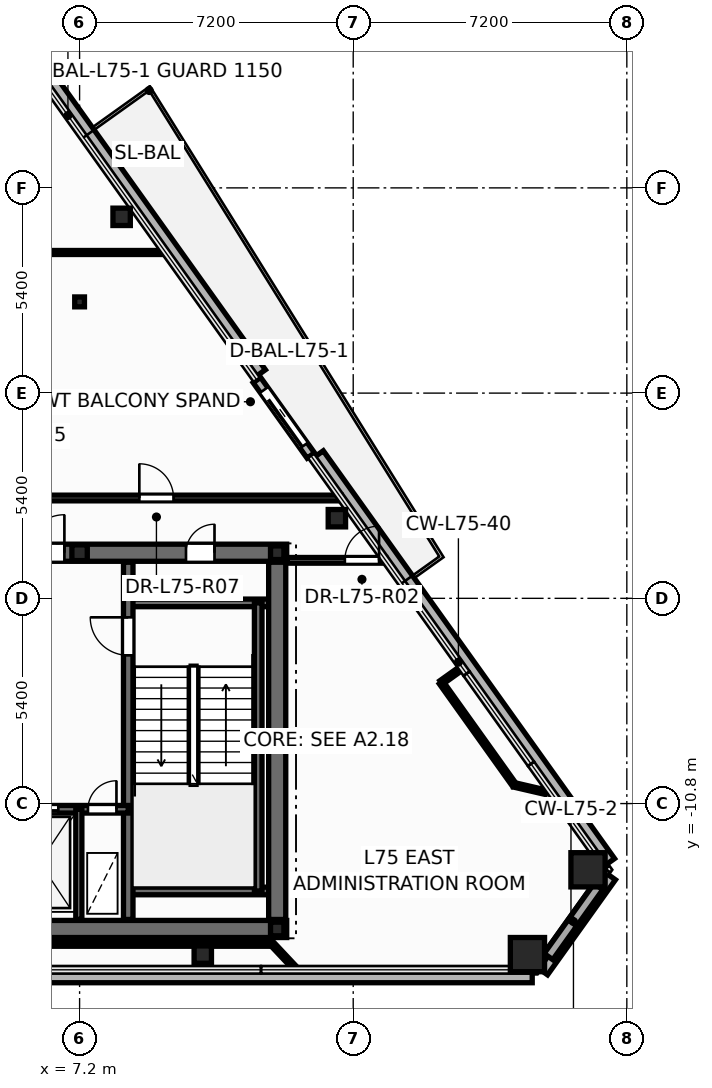
"""IFC4 building model, lengths in metres.
Left out: names, types, materials, properties, quantities, classifications, styles, units other than length and angle.
Written with IfcOpenShell. Run it as: python <this file> out.ifc"""

import sys

from ifc_helpers import new_model, si_unit, direction, frame, frame_2d, origin, origin_2d, place, context, subcontext, project, spatial, rectangle, hollow_rectangle, hollow_circle, i_section, extrude, element, fill, save


model = new_model("IFC4")
c1 = context("Model", 3, precision=1e-05, world=origin(), true_north=direction((0.0, 1.0)))
c2 = subcontext(c1, "Body", "Model", "MODEL_VIEW")
j1 = project(units=[si_unit("LENGTHUNIT", "METRE"), si_unit("PLANEANGLEUNIT", "RADIAN")], contexts=[c1])
p1 = place(None, origin())
s1 = spatial("IfcSite", under=j1, at=p1, CompositionType="ELEMENT")
p2 = place(p1, origin())
s2 = spatial("IfcBuilding", under=s1, at=p2, CompositionType="ELEMENT")
p3 = place(p2, frame((0.0, 0.0, 285.0)))
s3 = spatial("IfcBuildingStorey", under=s2, at=p3, CompositionType="ELEMENT", Elevation=285.0)
for number, where, z_axis, x_axis in (
    (1, (18.985, -14.774, 0.0), (0.0, 0.0, 1.0), (1.0, 0.0, 0.0)),
    (2, (20.579, -12.543, 0.0), (0.0, 0.0, 1.0), (1.0, 0.0, 0.0)),
):
    element("IfcColumn", number, at=place(p3, frame(where, z_axis=z_axis, x_axis=x_axis)), inside=s3, PredefinedType="COLUMN", context=c2, shape_type="SweptSolid", body=[
        extrude(hollow_rectangle(XDim=0.9, YDim=0.9, WallThickness=0.04, at=origin_2d()), origin(), (0.0, 0.0, 1.0), 4.2),
    ])
for number, where, z_axis, x_axis in (
    (3, (10.442, -14.774, 0.0), (0.0, 0.0, 1.0), (1.0, 0.0, 0.0)),
    (4, (13.97, -3.292, 0.0), (0.0, 0.0, 1.0), (1.0, 0.0, 0.0)),
    (5, (8.306, 4.638, 0.0), (0.0, 0.0, 1.0), (1.0, 0.0, 0.0)),
):
    element("IfcColumn", number, at=place(p3, frame(where, z_axis=z_axis, x_axis=x_axis)), inside=s3, PredefinedType="COLUMN", context=c2, shape_type="SweptSolid", body=[
        extrude(hollow_circle(Radius=0.229, WallThickness=0.016, at=origin_2d()), origin(), (0.0, 0.0, 1.0), 4.2),
    ])
for number, where, z_axis, x_axis in (
    (6, (12.4, -14.1, 0.0), (0.0, 0.0, 1.0), (1.0, 0.0, 0.0)),
    (7, (12.4, -4.2, 0.0), (0.0, 0.0, 1.0), (1.0, 0.0, 0.0)),
):
    element("IfcColumn", number, at=place(p3, frame(where, z_axis=z_axis, x_axis=x_axis)), inside=s3, PredefinedType="COLUMN", context=c2, shape_type="SweptSolid", body=[
        extrude(i_section(OverallWidth=0.352, OverallDepth=0.359, WebThickness=0.018, FlangeThickness=0.026, at=origin_2d()), origin(), (0.0, 0.0, 1.0), 4.2),
    ])
p4 = place(p3, frame((7.2, -4.2, 0.0), z_axis=(0.0, 0.0, 1.0), x_axis=(1.0, 0.0, 0.0)))
e8 = element("IfcColumn", 8, at=p4, inside=s3, PredefinedType="PILASTER", context=c2, shape_type="SweptSolid", body=[
    extrude(i_section(OverallWidth=0.405, OverallDepth=0.414, WebThickness=0.022, FlangeThickness=0.032, at=origin_2d()), origin(), (0.0, 0.0, 1.0), 4.2),
])
p5 = place(p3, frame((7.2, 2.4, 0.0), z_axis=(0.0, 0.0, 1.0), x_axis=(1.0, 0.0, 0.0)))
e9 = element("IfcColumn", 9, at=p5, inside=s3, PredefinedType="COLUMN", context=c2, shape_type="SweptSolid", body=[
    extrude(i_section(OverallWidth=0.256, OverallDepth=0.26, WebThickness=0.01, FlangeThickness=0.017, at=origin_2d()), origin(), (0.0, 0.0, 1.0), 4.2),
])
p6 = place(p3, frame((-19.111, -15.334, -0.2), z_axis=(0.0, 0.0, 1.0), x_axis=(1.0, 0.0, 0.0)))
e10 = element("IfcWall", 10, at=p6, inside=s3, PredefinedType="PARAPET", context=c2, shape_type="SweptSolid", body=[
    extrude(rectangle(XDim=38.221, YDim=0.36, at=frame_2d((19.111, 0.0))), origin(), (0.0, 0.0, 1.0), 0.38),
])
p7 = place(p3, frame((19.367, -15.202, -0.2), z_axis=(0.0, 0.0, 1.0), x_axis=(0.581260731052, 0.813717372641, 0.0)))
e11 = element("IfcWall", 11, at=p7, inside=s3, PredefinedType="PARAPET", context=c2, shape_type="SweptSolid", body=[
    extrude(rectangle(XDim=3.074, YDim=0.36, at=frame_2d((1.537, 0.0))), origin(), (0.0, 0.0, 1.0), 0.38),
])
p8 = place(p3, frame((21.131, -12.352, -0.2), z_axis=(0.0, 0.0, 1.0), x_axis=(-0.581231188145, 0.813738475143, 0.0)))
e12 = element("IfcWall", 12, at=p8, inside=s3, PredefinedType="PARAPET", context=c2, shape_type="SweptSolid", body=[
    extrude(rectangle(XDim=13.186, YDim=0.36, at=frame_2d((6.593, 0.0))), origin(), (0.0, 0.0, 1.0), 0.38),
])
p9 = place(p3, frame((11.943, 0.51, -0.2), z_axis=(0.0, 0.0, 1.0), x_axis=(-0.5812463791, 0.813727624444, 0.0)))
e13 = element("IfcWall", 13, at=p9, inside=s3, PredefinedType="PARAPET", context=c2, shape_type="SweptSolid", body=[
    extrude(rectangle(XDim=16.928, YDim=0.36, at=frame_2d((8.464, 0.0))), origin(), (0.0, 0.0, 1.0), 0.38),
])
p10 = place(p3, frame((13.284, -1.642, -0.015), z_axis=(0.0, 0.0, 1.0), x_axis=(-0.581266589652, 0.813713187649, 0.0)))
e14 = element("IfcWall", 14, at=p10, inside=s3, PredefinedType="STANDARD", context=c2, shape_type="SweptSolid", body=[
    extrude(rectangle(XDim=2.44, YDim=0.24, at=frame_2d((1.22, 0.0))), origin(), (0.0, 0.0, 1.0), 3.453),
])
p11 = place(p10, frame((0.32, 0.0, 0.015)))
e15 = element("IfcOpeningElement", 15, at=p11, cuts=e14, PredefinedType="OPENING", context=c2, shape_type="SweptSolid", body=[
    extrude(rectangle(XDim=1.806, YDim=2.204, at=frame_2d((0.9, 1.102))), frame((0.0, 0.13, 0.0), z_axis=(0.0, -1.0, 0.0), x_axis=(1.0, 0.0, 0.0)), (0.0, 0.0, 1.0), 0.26),
])
p12 = place(p3, frame((-12.65, -14.1, 0.0), z_axis=(0.0, 0.0, 1.0), x_axis=(1.0, 0.0, 0.0)))
e16 = element("IfcWall", 16, at=p12, inside=s3, PredefinedType="SHEAR", context=c2, shape_type="SweptSolid", body=[
    extrude(rectangle(XDim=25.3, YDim=0.45, at=frame_2d((12.65, 0.0))), origin(), (0.0, 0.0, 1.0), 4.2),
])
p13 = place(p3, frame((-12.65, -4.2, 0.0), z_axis=(0.0, 0.0, 1.0), x_axis=(1.0, 0.0, 0.0)))
e17 = element("IfcWall", 17, at=p13, inside=s3, PredefinedType="SHEAR", context=c2, shape_type="SweptSolid", body=[
    extrude(rectangle(XDim=25.3, YDim=0.45, at=frame_2d((12.65, 0.0))), origin(), (0.0, 0.0, 1.0), 4.2),
])
p14 = place(p13, frame((1.85, 0.0, 0.0)))
e18 = element("IfcOpeningElement", 18, at=p14, cuts=e17, PredefinedType="OPENING", context=c2, shape_type="SweptSolid", body=[
    extrude(rectangle(XDim=0.756, YDim=2.054, at=frame_2d((0.375, 1.027))), frame((0.0, 0.235, 0.0), z_axis=(0.0, -1.0, 0.0), x_axis=(1.0, 0.0, 0.0)), (0.0, 0.0, 1.0), 0.47),
])
p15 = place(p13, frame((22.65, 0.0, 0.0)))
e19 = element("IfcOpeningElement", 19, at=p15, cuts=e17, PredefinedType="OPENING", context=c2, shape_type="SweptSolid", body=[
    extrude(rectangle(XDim=0.756, YDim=2.054, at=frame_2d((0.375, 1.027))), frame((0.0, 0.235, 0.0), z_axis=(0.0, -1.0, 0.0), x_axis=(1.0, 0.0, 0.0)), (0.0, 0.0, 1.0), 0.47),
])
p16 = place(p13, frame((5.85, 0.0, 0.0)))
e20 = element("IfcOpeningElement", 20, at=p16, cuts=e17, PredefinedType="OPENING", context=c2, shape_type="SweptSolid", body=[
    extrude(rectangle(XDim=1.006, YDim=2.104, at=frame_2d((0.5, 1.052))), frame((0.0, 0.235, 0.0), z_axis=(0.0, -1.0, 0.0), x_axis=(1.0, 0.0, 0.0)), (0.0, 0.0, 1.0), 0.47),
])
p17 = place(p13, frame((10.35, 0.0, 0.0)))
e21 = element("IfcOpeningElement", 21, at=p17, cuts=e17, PredefinedType="OPENING", context=c2, shape_type="SweptSolid", body=[
    extrude(rectangle(XDim=1.406, YDim=2.154, at=frame_2d((0.7, 1.077))), frame((0.0, 0.235, 0.0), z_axis=(0.0, -1.0, 0.0), x_axis=(1.0, 0.0, 0.0)), (0.0, 0.0, 1.0), 0.47),
])
p18 = place(p13, frame((18.45, 0.0, 0.0)))
e22 = element("IfcOpeningElement", 22, at=p18, cuts=e17, PredefinedType="OPENING", context=c2, shape_type="SweptSolid", body=[
    extrude(rectangle(XDim=1.006, YDim=2.104, at=frame_2d((0.5, 1.052))), frame((0.0, 0.235, 0.0), z_axis=(0.0, -1.0, 0.0), x_axis=(1.0, 0.0, 0.0)), (0.0, 0.0, 1.0), 0.47),
])
for number, where, z_axis, x_axis in (
    (23, (8.48, -5.52, 0.0), (0.0, 0.0, 1.0), (1.0, 0.0, 0.0)),
    (24, (8.48, -13.1, 0.0), (0.0, 0.0, 1.0), (1.0, 0.0, 0.0)),
):
    element("IfcWall", number, at=place(p3, frame(where, z_axis=z_axis, x_axis=x_axis)), inside=s3, PredefinedType="SOLIDWALL", context=c2, shape_type="SweptSolid", body=[
        extrude(rectangle(XDim=3.87, YDim=0.2, at=frame_2d((1.935, 0.0))), origin(), (0.0, 0.0, 1.0), 4.2),
    ])
p19 = place(p3, frame((11.9, -13.1, 0.0), z_axis=(0.0, 0.0, 1.0), x_axis=(0.0, 1.0, 0.0)))
e25 = element("IfcWall", 25, at=p19, inside=s3, PredefinedType="SOLIDWALL", context=c2, shape_type="SweptSolid", body=[
    extrude(rectangle(XDim=7.58, YDim=0.2, at=frame_2d((3.79, 0.0))), origin(), (0.0, 0.0, 1.0), 4.2),
])
p20 = place(p3, frame((8.48, -13.85, 0.0), z_axis=(0.0, 0.0, 1.0), x_axis=(0.0, 1.0, 0.0)))
e26 = element("IfcWall", 26, at=p20, inside=s3, PredefinedType="SHEAR", context=c2, shape_type="SweptSolid", body=[
    extrude(rectangle(XDim=9.4, YDim=0.25, at=frame_2d((4.7, 0.0))), origin(), (0.0, 0.0, 1.0), 4.2),
])
p21 = place(p20, frame((6.95, 0.0, 0.0)))
e27 = element("IfcOpeningElement", 27, at=p21, cuts=e26, PredefinedType="OPENING", context=c2, shape_type="SweptSolid", body=[
    extrude(rectangle(XDim=1.006, YDim=2.104, at=frame_2d((0.5, 1.052))), frame((0.0, 0.135, 0.0), z_axis=(0.0, -1.0, 0.0), x_axis=(1.0, 0.0, 0.0)), (0.0, 0.0, 1.0), 0.27),
])
p22 = place(p3, frame((5.12, -10.95, 0.0), z_axis=(0.0, 0.0, 1.0), x_axis=(1.0, 0.0, 0.0)))
e28 = element("IfcWall", 28, at=p22, inside=s3, PredefinedType="SOLIDWALL", context=c2, shape_type="SweptSolid", body=[
    extrude(rectangle(XDim=3.36, YDim=0.2, at=frame_2d((1.68, 0.0))), origin(), (0.0, 0.0, 1.0), 4.2),
])
p23 = place(p22, frame((0.42, 0.0, 0.0)))
e29 = element("IfcOpeningElement", 29, at=p23, cuts=e28, PredefinedType="OPENING", context=c2, shape_type="SweptSolid", body=[
    extrude(rectangle(XDim=1.106, YDim=2.104, at=frame_2d((0.55, 1.052))), frame((0.0, 0.11, 0.0), z_axis=(0.0, -1.0, 0.0), x_axis=(1.0, 0.0, 0.0)), (0.0, 0.0, 1.0), 0.22),
])
p24 = place(p22, frame((2.3, 0.0, 0.0)))
e30 = element("IfcOpeningElement", 30, at=p24, cuts=e28, PredefinedType="OPENING", context=c2, shape_type="SweptSolid", body=[
    extrude(rectangle(XDim=0.756, YDim=2.054, at=frame_2d((0.375, 1.027))), frame((0.0, 0.11, 0.0), z_axis=(0.0, -1.0, 0.0), x_axis=(1.0, 0.0, 0.0)), (0.0, 0.0, 1.0), 0.22),
])
p25 = place(p3, frame((7.18, -13.85, 0.0), z_axis=(0.0, 0.0, 1.0), x_axis=(0.0, 1.0, 0.0)))
e31 = element("IfcWall", 31, at=p25, inside=s3, PredefinedType="PARTITIONING", context=c2, shape_type="SweptSolid", body=[
    extrude(rectangle(XDim=2.9, YDim=0.16, at=frame_2d((1.45, 0.0))), origin(), (0.0, 0.0, 1.0), 3.145),
])
p26 = place(p3, frame((12.4, -13.85, 0.0), z_axis=(0.0, 0.0, 1.0), x_axis=(0.0, 1.0, 0.0)))
e32 = element("IfcWall", 32, at=p26, inside=s3, PredefinedType="SHEAR", context=c2, shape_type="SweptSolid", body=[
    extrude(rectangle(XDim=9.4, YDim=0.45, at=frame_2d((4.7, 0.0))), origin(), (0.0, 0.0, 1.0), 4.2),
])
p27 = place(p3, frame((5.1, -2.76, 0.0), z_axis=(0.0, 0.0, 1.0), x_axis=(1.0, 0.0, 0.0)))
e33 = element("IfcWall", 33, at=p27, inside=s3, PredefinedType="PARTITIONING", context=c2, shape_type="SweptSolid", body=[
    extrude(rectangle(XDim=8.982, YDim=0.15, at=frame_2d((4.491, 0.0))), origin(), (0.0, 0.0, 1.0), 2.895),
])
p28 = place(p27, frame((3.672, 0.0, 0.0)))
e34 = element("IfcOpeningElement", 34, at=p28, cuts=e33, PredefinedType="OPENING", context=c2, shape_type="SweptSolid", body=[
    extrude(rectangle(XDim=0.906, YDim=2.104, at=frame_2d((0.45, 1.052))), frame((0.0, 0.085, 0.0), z_axis=(0.0, -1.0, 0.0), x_axis=(1.0, 0.0, 0.0)), (0.0, 0.0, 1.0), 0.17),
])
p29 = place(p3, frame((5.558, -14.494, 0.0), z_axis=(0.0, 0.0, 1.0), x_axis=(1.0, 0.0, 0.0)))
e35 = element("IfcWall", 35, at=p29, inside=s3, PredefinedType="PARTITIONING", context=c2, shape_type="SweptSolid", body=[
    extrude(rectangle(XDim=6.711, YDim=0.12, at=frame_2d((3.356, 0.0))), origin(), (0.0, 0.0, 1.0), 3.438),
])
p30 = place(p3, frame((2.36, 3.7, 0.0), z_axis=(0.0, 0.0, 1.0), x_axis=(1.0, 0.0, 0.0)))
e36 = element("IfcWall", 36, at=p30, inside=s3, PredefinedType="PARTITIONING", context=c2, shape_type="SweptSolid", body=[
    extrude(rectangle(XDim=7.108, YDim=0.105, at=frame_2d((3.554, 0.0))), origin(), (0.0, 0.0, 1.0), 3.293),
])
p31 = place(p3, frame((12.652, -4.4, 0.0), z_axis=(0.0, 0.0, 1.0), x_axis=(1.0, 0.0, 0.0)))
e37 = element("IfcWall", 37, at=p31, inside=s3, PredefinedType="PARTITIONING", context=c2, shape_type="SweptSolid", body=[
    extrude(rectangle(XDim=2.602, YDim=0.15, at=frame_2d((1.301, 0.0))), origin(), (0.0, 0.0, 1.0), 2.895),
])
p32 = place(p31, frame((1.528, 0.0, 0.0)))
e38 = element("IfcOpeningElement", 38, at=p32, cuts=e37, PredefinedType="OPENING", context=c2, shape_type="SweptSolid", body=[
    extrude(rectangle(XDim=0.906, YDim=2.104, at=frame_2d((0.45, 1.052))), frame((0.0, 0.085, 0.0), z_axis=(0.0, -1.0, 0.0), x_axis=(1.0, 0.0, 0.0)), (0.0, 0.0, 1.0), 0.17),
])
p33 = place(p3, frame((18.64, -10.31, 0.0), z_axis=(0.0, 0.0, 1.0), x_axis=(-0.581217264706, 0.813748420095, 0.0)))
e39 = element("IfcWall", 39, at=p33, inside=s3, PredefinedType="PARTITIONING", context=c2, shape_type="SweptSolid", body=[
    extrude(rectangle(XDim=3.31, YDim=0.12, at=frame_2d((1.655, 0.0))), origin(), (0.0, 0.0, 1.0), 2.895),
])
p34 = place(p3, frame((19.469, -10.502, 0.0), z_axis=(0.0, 0.0, 1.0), x_axis=(-0.974134409857, 0.22596935972, 0.0)))
e40 = element("IfcWall", 40, at=p34, inside=s3, PredefinedType="PARTITIONING", context=c2, shape_type="SweptSolid", body=[
    extrude(rectangle(XDim=0.851, YDim=0.12, at=frame_2d((0.426, 0.0))), origin(), (0.0, 0.0, 1.0), 2.895),
])
p35 = place(p3, frame((12.27, -14.494, 0.0), z_axis=(0.0, 0.0, 1.0), x_axis=(0.685203170989, -0.728351985283, 0.0)))
e41 = element("IfcWall", 41, at=p35, inside=s3, PredefinedType="PARTITIONING", context=c2, shape_type="SweptSolid", body=[
    extrude(rectangle(XDim=0.849, YDim=0.12, at=frame_2d((0.424, 0.0))), origin(), (0.0, 0.0, 1.0), 3.438),
])
p36 = place(p3, frame((16.716, -7.616, 0.0), z_axis=(0.0, 0.0, 1.0), x_axis=(0.813610304042, 0.581410589134, 0.0)))
e42 = element("IfcWall", 42, at=p36, inside=s3, PredefinedType="PARTITIONING", context=c2, shape_type="SweptSolid", body=[
    extrude(rectangle(XDim=0.67, YDim=0.12, at=frame_2d((0.335, 0.0))), origin(), (0.0, 0.0, 1.0), 3.438),
])
p37 = place(p11, origin())
e43 = element("IfcDoor", 43, at=p37, inside=s3, OperationType="SLIDING_TO_LEFT", PredefinedType="DOOR", context=c2, shape_type="SweptSolid", body=[
    extrude(rectangle(XDim=1.8, YDim=2.2, at=frame_2d((0.9, 1.1))), frame((0.0, 0.025, 0.0), z_axis=(0.0, -1.0, 0.0), x_axis=(1.0, 0.0, 0.0)), (0.0, 0.0, 1.0), 0.05),
])
fill(e15, e43)
p38 = place(p21, origin())
e44 = element("IfcDoor", 44, at=p38, inside=s3, OperationType="SINGLE_SWING_RIGHT", PredefinedType="DOOR", context=c2, shape_type="SweptSolid", body=[
    extrude(rectangle(XDim=1.0, YDim=2.1, at=frame_2d((0.5, 1.05))), frame((0.0, 0.025, 0.0), z_axis=(0.0, -1.0, 0.0), x_axis=(1.0, 0.0, 0.0)), (0.0, 0.0, 1.0), 0.05),
])
fill(e27, e44)
p39 = place(p23, origin())
e45 = element("IfcDoor", 45, at=p39, inside=s3, OperationType="DOUBLE_DOOR_SLIDING", PredefinedType="DOOR", context=c2, shape_type="SweptSolid", body=[
    extrude(rectangle(XDim=1.1, YDim=2.1, at=frame_2d((0.55, 1.05))), frame((0.0, 0.025, 0.0), z_axis=(0.0, -1.0, 0.0), x_axis=(1.0, 0.0, 0.0)), (0.0, 0.0, 1.0), 0.05),
])
fill(e29, e45)
p40 = place(p24, origin())
e46 = element("IfcDoor", 46, at=p40, inside=s3, OperationType="SINGLE_SWING_RIGHT", PredefinedType="DOOR", context=c2, shape_type="SweptSolid", body=[
    extrude(rectangle(XDim=0.75, YDim=2.05, at=frame_2d((0.375, 1.025))), frame((0.0, 0.025, 0.0), z_axis=(0.0, -1.0, 0.0), x_axis=(1.0, 0.0, 0.0)), (0.0, 0.0, 1.0), 0.05),
])
fill(e30, e46)
p41 = place(p15, origin())
e47 = element("IfcDoor", 47, at=p41, inside=s3, OperationType="SINGLE_SWING_RIGHT", PredefinedType="DOOR", context=c2, shape_type="SweptSolid", body=[
    extrude(rectangle(XDim=0.75, YDim=2.05, at=frame_2d((0.375, 1.025))), frame((0.0, 0.025, 0.0), z_axis=(0.0, -1.0, 0.0), x_axis=(1.0, 0.0, 0.0)), (0.0, 0.0, 1.0), 0.05),
])
fill(e19, e47)
p42 = place(p18, origin())
e48 = element("IfcDoor", 48, at=p42, inside=s3, OperationType="SINGLE_SWING_RIGHT", PredefinedType="DOOR", context=c2, shape_type="SweptSolid", body=[
    extrude(rectangle(XDim=1.0, YDim=2.1, at=frame_2d((0.5, 1.05))), frame((0.0, 0.025, 0.0), z_axis=(0.0, -1.0, 0.0), x_axis=(1.0, 0.0, 0.0)), (0.0, 0.0, 1.0), 0.05),
])
fill(e22, e48)
p43 = place(p32, origin())
e49 = element("IfcDoor", 49, at=p43, inside=s3, OperationType="SINGLE_SWING_RIGHT", PredefinedType="DOOR", context=c2, shape_type="SweptSolid", body=[
    extrude(rectangle(XDim=0.9, YDim=2.1, at=frame_2d((0.45, 1.05))), frame((0.0, 0.025, 0.0), z_axis=(0.0, -1.0, 0.0), x_axis=(1.0, 0.0, 0.0)), (0.0, 0.0, 1.0), 0.05),
])
fill(e38, e49)
p44 = place(p28, origin())
e50 = element("IfcDoor", 50, at=p44, inside=s3, OperationType="SINGLE_SWING_LEFT", PredefinedType="DOOR", context=c2, shape_type="SweptSolid", body=[
    extrude(rectangle(XDim=0.9, YDim=2.1, at=frame_2d((0.45, 1.05))), frame((0.0, 0.025, 0.0), z_axis=(0.0, -1.0, 0.0), x_axis=(1.0, 0.0, 0.0)), (0.0, 0.0, 1.0), 0.05),
])
fill(e34, e50)
save(model, sys.argv[1])
